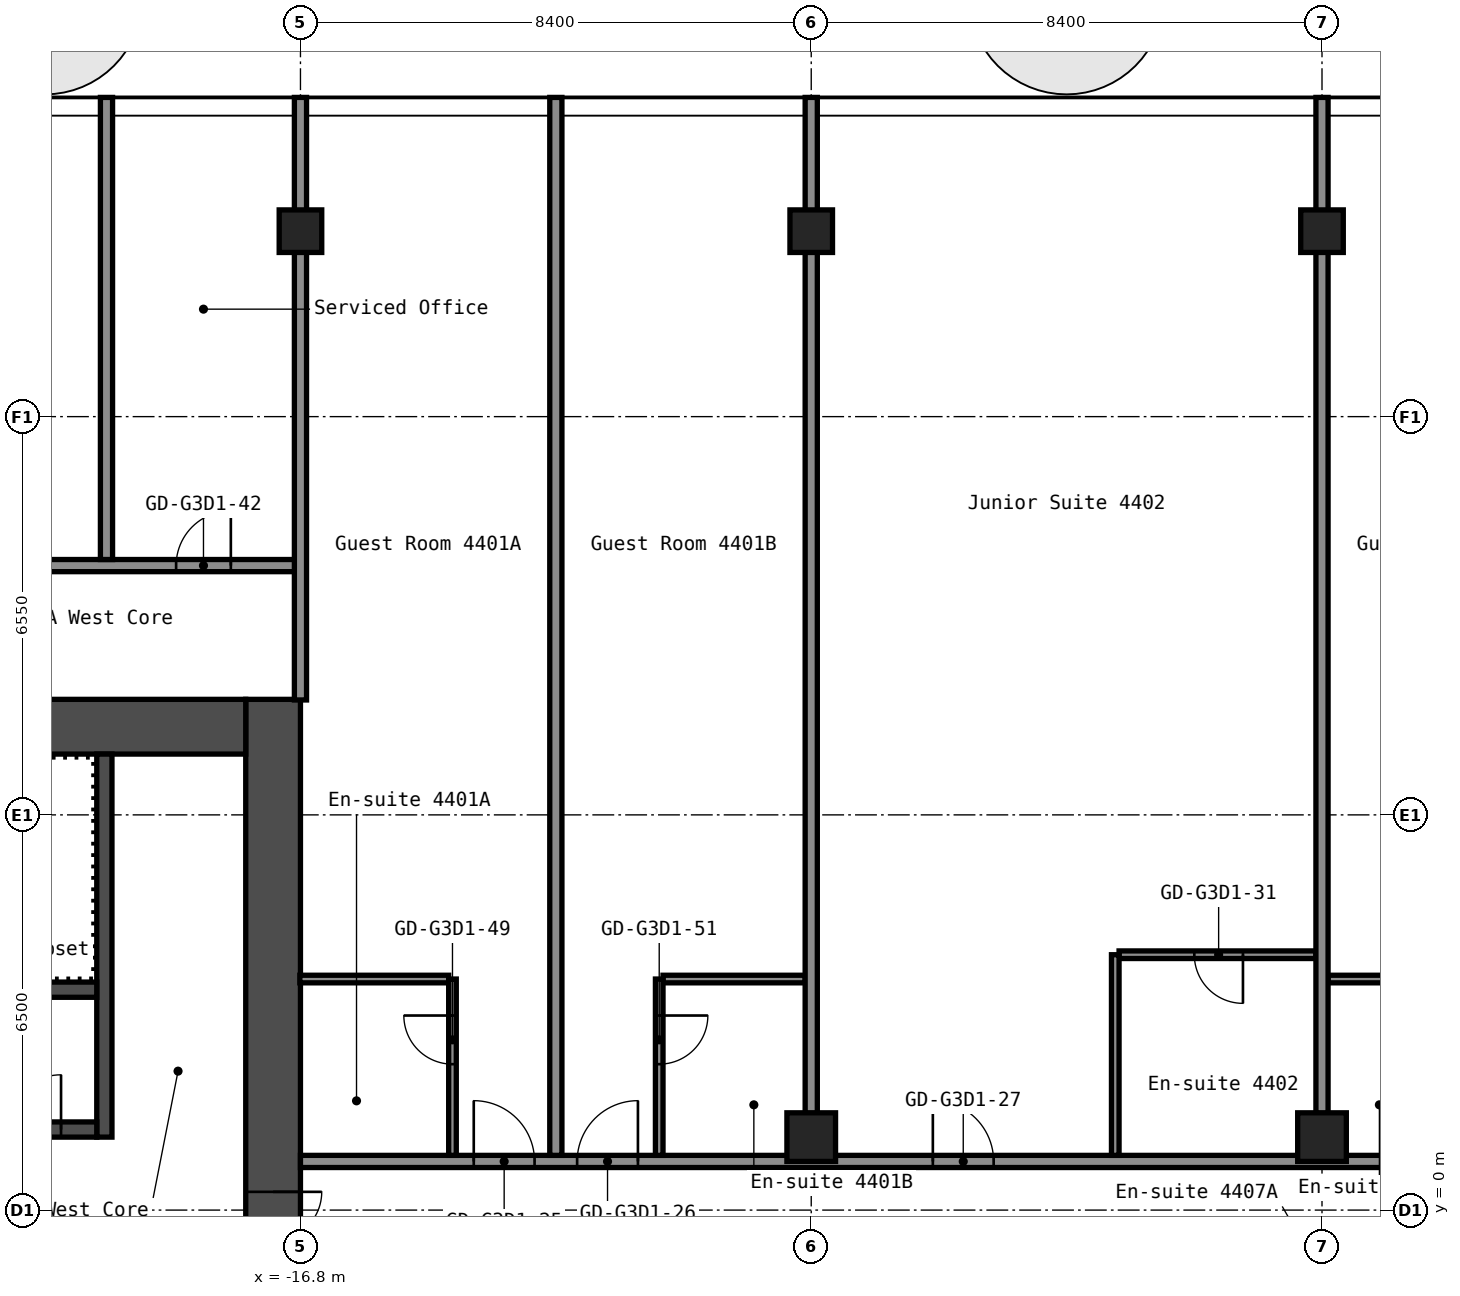
"""IFC4 building model, lengths in metres.
Left out: names, types, materials, properties, quantities, classifications, styles, units other than length and angle.
Written with IfcOpenShell. Run it as: python <this file> out.ifc"""

import sys

from ifc_helpers import new_model, si_unit, direction, frame, frame_2d, origin, origin_2d, place, context, subcontext, project, spatial, rectangle, hollow_rectangle, extrude, element, fill, save


model = new_model("IFC4")
c1 = context("Model", 3, precision=1e-05, world=origin(), true_north=direction((0.0, 1.0)))
c2 = subcontext(c1, "Body", "Model", "MODEL_VIEW")
j1 = project(units=[si_unit("LENGTHUNIT", "METRE"), si_unit("PLANEANGLEUNIT", "RADIAN")], contexts=[c1])
p1 = place(None, origin())
s1 = spatial("IfcSite", under=j1, at=p1, CompositionType="ELEMENT")
p2 = place(p1, origin())
s2 = spatial("IfcBuilding", under=s1, at=p2, CompositionType="ELEMENT")
p3 = place(p2, frame((0.0, 0.0, 156.6)))
s3 = spatial("IfcBuildingStorey", under=s2, at=p3, CompositionType="ELEMENT", Elevation=156.6)
p4 = place(p3, frame((-16.8, 16.1, 0.0), z_axis=(0.0, 0.0, 1.0), x_axis=(1.0, 0.0, 0.0)))
e1 = element("IfcColumn", 1, at=p4, inside=s3, PredefinedType="COLUMN", context=c2, shape_type="SweptSolid", body=[
    extrude(hollow_rectangle(XDim=0.7, YDim=0.7, WallThickness=0.028, at=origin_2d()), origin(), (0.0, 0.0, 1.0), 2.75),
])
p5 = place(p3, frame((-8.4, 1.2, 0.0), z_axis=(0.0, 0.0, 1.0), x_axis=(1.0, 0.0, 0.0)))
e2 = element("IfcColumn", 2, at=p5, inside=s3, PredefinedType="COLUMN", context=c2, shape_type="SweptSolid", body=[
    extrude(hollow_rectangle(XDim=0.8, YDim=0.8, WallThickness=0.032, at=origin_2d()), origin(), (0.0, 0.0, 1.0), 2.75),
])
p6 = place(p3, frame((-8.4, 16.1, 0.0), z_axis=(0.0, 0.0, 1.0), x_axis=(1.0, 0.0, 0.0)))
e3 = element("IfcColumn", 3, at=p6, inside=s3, PredefinedType="COLUMN", context=c2, shape_type="SweptSolid", body=[
    extrude(hollow_rectangle(XDim=0.7, YDim=0.7, WallThickness=0.028, at=origin_2d()), origin(), (0.0, 0.0, 1.0), 2.75),
])
p7 = place(p3, frame((0.0, 1.2, 0.0), z_axis=(0.0, 0.0, 1.0), x_axis=(1.0, 0.0, 0.0)))
e4 = element("IfcColumn", 4, at=p7, inside=s3, PredefinedType="COLUMN", context=c2, shape_type="SweptSolid", body=[
    extrude(hollow_rectangle(XDim=0.8, YDim=0.8, WallThickness=0.032, at=origin_2d()), origin(), (0.0, 0.0, 1.0), 2.75),
])
p8 = place(p3, frame((0.0, 16.1, 0.0), z_axis=(0.0, 0.0, 1.0), x_axis=(1.0, 0.0, 0.0)))
e5 = element("IfcColumn", 5, at=p8, inside=s3, PredefinedType="COLUMN", context=c2, shape_type="SweptSolid", body=[
    extrude(hollow_rectangle(XDim=0.7, YDim=0.7, WallThickness=0.028, at=origin_2d()), origin(), (0.0, 0.0, 1.0), 2.75),
])
p9 = place(p3, frame((-17.25, -8.4, 0.0), z_axis=(0.0, 0.0, 1.0), x_axis=(0.0, 1.0, 0.0)))
e6 = element("IfcWall", 6, at=p9, inside=s3, PredefinedType="SHEAR", context=c2, shape_type="SweptSolid", body=[
    extrude(rectangle(XDim=16.8, YDim=0.9, at=frame_2d((8.4, 0.0))), origin(), (0.0, 0.0, 1.0), 2.75),
])
p10 = place(p9, frame((7.1, 0.0, 0.0)))
e7 = element("IfcOpeningElement", 7, at=p10, cuts=e6, PredefinedType="OPENING", context=c2, shape_type="SweptSolid", body=[
    extrude(rectangle(XDim=1.6, YDim=2.1, at=frame_2d((0.8, 1.05))), frame((0.0, 0.46, 0.0), z_axis=(0.0, -1.0, 0.0), x_axis=(1.0, 0.0, 0.0)), (0.0, 0.0, 1.0), 0.92),
])
p11 = place(p3, frame((-32.7, 7.95, 0.0), z_axis=(0.0, 0.0, 1.0), x_axis=(1.0, 0.0, 0.0)))
e8 = element("IfcWall", 8, at=p11, inside=s3, PredefinedType="SHEAR", context=c2, shape_type="SweptSolid", body=[
    extrude(rectangle(XDim=15.0, YDim=0.9, at=frame_2d((7.5, 0.0))), origin(), (0.0, 0.0, 1.0), 2.75),
])
p12 = place(p11, frame((3.4, 0.0, 0.0)))
e9 = element("IfcOpeningElement", 9, at=p12, cuts=e8, PredefinedType="OPENING", context=c2, shape_type="SweptSolid", body=[
    extrude(rectangle(XDim=1.2, YDim=2.1, at=frame_2d((0.6, 1.05))), frame((0.0, 0.46, 0.0), z_axis=(0.0, -1.0, 0.0), x_axis=(1.0, 0.0, 0.0)), (0.0, 0.0, 1.0), 0.92),
])
p13 = place(p11, frame((0.75, 0.0, 0.0)))
e10 = element("IfcOpeningElement", 10, at=p13, cuts=e8, PredefinedType="OPENING", context=c2, shape_type="SweptSolid", body=[
    extrude(rectangle(XDim=0.9, YDim=2.1, at=frame_2d((0.45, 1.05))), frame((0.0, 0.46, 0.0), z_axis=(0.0, -1.0, 0.0), x_axis=(1.0, 0.0, 0.0)), (0.0, 0.0, 1.0), 0.92),
])
p14 = place(p3, frame((-20.025, 1.2, 0.0), z_axis=(0.0, 0.0, 1.0), x_axis=(0.0, 1.0, 0.0)))
e11 = element("IfcWall", 11, at=p14, inside=s3, PredefinedType="SHEAR", context=c2, shape_type="SweptSolid", body=[
    extrude(rectangle(XDim=6.3, YDim=0.25, at=frame_2d((3.15, 0.0))), origin(), (0.0, 0.0, 1.0), 2.75),
])
p15 = place(p3, frame((-27.65, 1.325, 0.0), z_axis=(0.0, 0.0, 1.0), x_axis=(1.0, 0.0, 0.0)))
e12 = element("IfcWall", 12, at=p15, inside=s3, PredefinedType="SHEAR", context=c2, shape_type="SweptSolid", body=[
    extrude(rectangle(XDim=7.5, YDim=0.25, at=frame_2d((3.75, 0.0))), origin(), (0.0, 0.0, 1.0), 2.75),
])
p16 = place(p15, frame((6.012, 0.0, 0.0)))
e13 = element("IfcOpeningElement", 13, at=p16, cuts=e12, PredefinedType="OPENING", context=c2, shape_type="SweptSolid", body=[
    extrude(rectangle(XDim=0.9, YDim=2.1, at=frame_2d((0.45, 1.05))), frame((0.0, 0.135, 0.0), z_axis=(0.0, -1.0, 0.0), x_axis=(1.0, 0.0, 0.0)), (0.0, 0.0, 1.0), 0.27),
])
p17 = place(p15, frame((2.312, 0.0, 0.0)))
e14 = element("IfcOpeningElement", 14, at=p17, cuts=e12, PredefinedType="OPENING", context=c2, shape_type="SweptSolid", body=[
    extrude(rectangle(XDim=0.9, YDim=2.1, at=frame_2d((0.45, 1.05))), frame((0.0, 0.135, 0.0), z_axis=(0.0, -1.0, 0.0), x_axis=(1.0, 0.0, 0.0)), (0.0, 0.0, 1.0), 0.27),
])
p18 = place(p3, frame((-27.65, 3.625, 0.0), z_axis=(0.0, 0.0, 1.0), x_axis=(1.0, 0.0, 0.0)))
e15 = element("IfcWall", 15, at=p18, inside=s3, PredefinedType="SHEAR", context=c2, shape_type="SweptSolid", body=[
    extrude(rectangle(XDim=7.5, YDim=0.25, at=frame_2d((3.75, 0.0))), origin(), (0.0, 0.0, 1.0), 2.75),
])
p19 = place(p3, frame((-16.8, 0.8, 0.0), z_axis=(0.0, 0.0, 1.0), x_axis=(1.0, 0.0, 0.0)))
e16 = element("IfcWall", 16, at=p19, inside=s3, PredefinedType="PARTITIONING", context=c2, shape_type="SweptSolid", body=[
    extrude(rectangle(XDim=33.6, YDim=0.2, at=frame_2d((16.8, 0.0))), origin(), (0.0, 0.0, 1.0), 2.75),
])
p20 = place(p19, frame((2.85, 0.0, 0.0)))
e17 = element("IfcOpeningElement", 17, at=p20, cuts=e16, PredefinedType="OPENING", context=c2, shape_type="SweptSolid", body=[
    extrude(rectangle(XDim=1.0, YDim=2.1, at=frame_2d((0.5, 1.05))), frame((0.0, 0.11, 0.0), z_axis=(0.0, -1.0, 0.0), x_axis=(1.0, 0.0, 0.0)), (0.0, 0.0, 1.0), 0.22),
])
p21 = place(p19, frame((4.55, 0.0, 0.0)))
e18 = element("IfcOpeningElement", 18, at=p21, cuts=e16, PredefinedType="OPENING", context=c2, shape_type="SweptSolid", body=[
    extrude(rectangle(XDim=1.0, YDim=2.1, at=frame_2d((0.5, 1.05))), frame((0.0, 0.11, 0.0), z_axis=(0.0, -1.0, 0.0), x_axis=(1.0, 0.0, 0.0)), (0.0, 0.0, 1.0), 0.22),
])
p22 = place(p19, frame((10.4, 0.0, 0.0)))
e19 = element("IfcOpeningElement", 19, at=p22, cuts=e16, PredefinedType="OPENING", context=c2, shape_type="SweptSolid", body=[
    extrude(rectangle(XDim=1.0, YDim=2.1, at=frame_2d((0.5, 1.05))), frame((0.0, 0.11, 0.0), z_axis=(0.0, -1.0, 0.0), x_axis=(1.0, 0.0, 0.0)), (0.0, 0.0, 1.0), 0.22),
])
p23 = place(p19, frame((19.65, 0.0, 0.0)))
e20 = element("IfcOpeningElement", 20, at=p23, cuts=e16, PredefinedType="OPENING", context=c2, shape_type="SweptSolid", body=[
    extrude(rectangle(XDim=1.0, YDim=2.1, at=frame_2d((0.5, 1.05))), frame((0.0, 0.11, 0.0), z_axis=(0.0, -1.0, 0.0), x_axis=(1.0, 0.0, 0.0)), (0.0, 0.0, 1.0), 0.22),
])
p24 = place(p19, frame((21.35, 0.0, 0.0)))
e21 = element("IfcOpeningElement", 21, at=p24, cuts=e16, PredefinedType="OPENING", context=c2, shape_type="SweptSolid", body=[
    extrude(rectangle(XDim=1.0, YDim=2.1, at=frame_2d((0.5, 1.05))), frame((0.0, 0.11, 0.0), z_axis=(0.0, -1.0, 0.0), x_axis=(1.0, 0.0, 0.0)), (0.0, 0.0, 1.0), 0.22),
])
p25 = place(p19, frame((30.6, 0.0, 0.0)))
e22 = element("IfcOpeningElement", 22, at=p25, cuts=e16, PredefinedType="OPENING", context=c2, shape_type="SweptSolid", body=[
    extrude(rectangle(XDim=1.0, YDim=2.1, at=frame_2d((0.5, 1.05))), frame((0.0, 0.11, 0.0), z_axis=(0.0, -1.0, 0.0), x_axis=(1.0, 0.0, 0.0)), (0.0, 0.0, 1.0), 0.22),
])
p26 = place(p3, frame((-16.81, 3.8, 0.0), z_axis=(0.0, 0.0, 1.0), x_axis=(1.0, 0.0, 0.0)))
e23 = element("IfcWall", 23, at=p26, inside=s3, PredefinedType="PARTITIONING", context=c2, shape_type="SweptSolid", body=[
    extrude(rectangle(XDim=2.448, YDim=0.125, at=frame_2d((1.224, 0.0))), origin(), (0.0, 0.0, 1.0), 2.75),
])
for number, where, z_axis, x_axis in (
    (24, (-10.837, 3.8, 0.0), (0.0, 0.0, 1.0), (1.0, 0.0, 0.0)),
    (25, (0.1, 3.8, 0.0), (0.0, 0.0, 1.0), (1.0, 0.0, 0.0)),
):
    element("IfcWall", number, at=place(p3, frame(where, z_axis=z_axis, x_axis=x_axis)), inside=s3, PredefinedType="PARTITIONING", context=c2, shape_type="SweptSolid", body=[
        extrude(rectangle(XDim=2.337, YDim=0.125, at=frame_2d((1.169, 0.0))), origin(), (0.0, 0.0, 1.0), 2.75),
    ])
p27 = place(p3, frame((-3.337, 4.2, 0.0), z_axis=(0.0, 0.0, 1.0), x_axis=(1.0, 0.0, 0.0)))
e26 = element("IfcWall", 26, at=p27, inside=s3, PredefinedType="PARTITIONING", context=c2, shape_type="SweptSolid", body=[
    extrude(rectangle(XDim=3.237, YDim=0.125, at=frame_2d((1.619, 0.0))), origin(), (0.0, 0.0, 1.0), 2.75),
])
p28 = place(p27, frame((1.238, 0.0, 0.0)))
e27 = element("IfcOpeningElement", 27, at=p28, cuts=e26, PredefinedType="OPENING", context=c2, shape_type="SweptSolid", body=[
    extrude(rectangle(XDim=0.8, YDim=2.1, at=frame_2d((0.4, 1.05))), frame((0.0, 0.073, 0.0), z_axis=(0.0, -1.0, 0.0), x_axis=(1.0, 0.0, 0.0)), (0.0, 0.0, 1.0), 0.145),
])
p29 = place(p3, frame((-42.7, 10.6, 0.0), z_axis=(0.0, 0.0, 1.0), x_axis=(1.0, 0.0, 0.0)))
e28 = element("IfcWall", 28, at=p29, inside=s3, PredefinedType="PARTITIONING", context=c2, shape_type="SweptSolid", body=[
    extrude(rectangle(XDim=25.9, YDim=0.2, at=frame_2d((12.95, 0.0))), origin(), (0.0, 0.0, 1.0), 2.75),
])
p30 = place(p29, frame((1.52, 0.0, 0.0)))
e29 = element("IfcOpeningElement", 29, at=p30, cuts=e28, PredefinedType="OPENING", context=c2, shape_type="SweptSolid", body=[
    extrude(rectangle(XDim=0.9, YDim=2.1, at=frame_2d((0.45, 1.05))), frame((0.0, 0.11, 0.0), z_axis=(0.0, -1.0, 0.0), x_axis=(1.0, 0.0, 0.0)), (0.0, 0.0, 1.0), 0.22),
])
p31 = place(p29, frame((5.92, 0.0, 0.0)))
e30 = element("IfcOpeningElement", 30, at=p31, cuts=e28, PredefinedType="OPENING", context=c2, shape_type="SweptSolid", body=[
    extrude(rectangle(XDim=0.9, YDim=2.1, at=frame_2d((0.45, 1.05))), frame((0.0, 0.11, 0.0), z_axis=(0.0, -1.0, 0.0), x_axis=(1.0, 0.0, 0.0)), (0.0, 0.0, 1.0), 0.22),
])
p32 = place(p29, frame((10.415, 0.0, 0.0)))
e31 = element("IfcOpeningElement", 31, at=p32, cuts=e28, PredefinedType="OPENING", context=c2, shape_type="SweptSolid", body=[
    extrude(rectangle(XDim=0.9, YDim=2.1, at=frame_2d((0.45, 1.05))), frame((0.0, 0.11, 0.0), z_axis=(0.0, -1.0, 0.0), x_axis=(1.0, 0.0, 0.0)), (0.0, 0.0, 1.0), 0.22),
])
p33 = place(p29, frame((14.615, 0.0, 0.0)))
e32 = element("IfcOpeningElement", 32, at=p33, cuts=e28, PredefinedType="OPENING", context=c2, shape_type="SweptSolid", body=[
    extrude(rectangle(XDim=0.9, YDim=2.1, at=frame_2d((0.45, 1.05))), frame((0.0, 0.11, 0.0), z_axis=(0.0, -1.0, 0.0), x_axis=(1.0, 0.0, 0.0)), (0.0, 0.0, 1.0), 0.22),
])
p34 = place(p29, frame((19.655, 0.0, 0.0)))
e33 = element("IfcOpeningElement", 33, at=p34, cuts=e28, PredefinedType="OPENING", context=c2, shape_type="SweptSolid", body=[
    extrude(rectangle(XDim=0.9, YDim=2.1, at=frame_2d((0.45, 1.05))), frame((0.0, 0.11, 0.0), z_axis=(0.0, -1.0, 0.0), x_axis=(1.0, 0.0, 0.0)), (0.0, 0.0, 1.0), 0.22),
])
p35 = place(p29, frame((23.855, 0.0, 0.0)))
e34 = element("IfcOpeningElement", 34, at=p35, cuts=e28, PredefinedType="OPENING", context=c2, shape_type="SweptSolid", body=[
    extrude(rectangle(XDim=0.9, YDim=2.1, at=frame_2d((0.45, 1.05))), frame((0.0, 0.11, 0.0), z_axis=(0.0, -1.0, 0.0), x_axis=(1.0, 0.0, 0.0)), (0.0, 0.0, 1.0), 0.22),
])
p36 = place(p3, frame((-19.99, 10.7, 0.0), z_axis=(0.0, 0.0, 1.0), x_axis=(0.0, 1.0, 0.0)))
e35 = element("IfcWall", 35, at=p36, inside=s3, PredefinedType="PARTITIONING", context=c2, shape_type="SweptSolid", body=[
    extrude(rectangle(XDim=7.6, YDim=0.2, at=frame_2d((3.8, 0.0))), origin(), (0.0, 0.0, 1.0), 2.75),
])
p37 = place(p3, frame((-16.8, 8.39, 0.0), z_axis=(0.0, 0.0, 1.0), x_axis=(0.0, 1.0, 0.0)))
e36 = element("IfcWall", 36, at=p37, inside=s3, PredefinedType="PARTITIONING", context=c2, shape_type="SweptSolid", body=[
    extrude(rectangle(XDim=9.91, YDim=0.2, at=frame_2d((4.955, 0.0))), origin(), (0.0, 0.0, 1.0), 2.75),
])
p38 = place(p3, frame((-14.3, 0.9, 0.0), z_axis=(0.0, 0.0, 1.0), x_axis=(0.0, 1.0, 0.0)))
e37 = element("IfcWall", 37, at=p38, inside=s3, PredefinedType="PARTITIONING", context=c2, shape_type="SweptSolid", body=[
    extrude(rectangle(XDim=2.9, YDim=0.125, at=frame_2d((1.45, 0.0))), origin(), (0.0, 0.0, 1.0), 2.75),
])
p39 = place(p38, frame((1.5, 0.0, 0.0)))
e38 = element("IfcOpeningElement", 38, at=p39, cuts=e37, PredefinedType="OPENING", context=c2, shape_type="SweptSolid", body=[
    extrude(rectangle(XDim=0.8, YDim=2.1, at=frame_2d((0.4, 1.05))), frame((0.0, 0.073, 0.0), z_axis=(0.0, -1.0, 0.0), x_axis=(1.0, 0.0, 0.0)), (0.0, 0.0, 1.0), 0.145),
])
p40 = place(p3, frame((-12.6, 0.9, 0.0), z_axis=(0.0, 0.0, 1.0), x_axis=(0.0, 1.0, 0.0)))
e39 = element("IfcWall", 39, at=p40, inside=s3, PredefinedType="PARTITIONING", context=c2, shape_type="SweptSolid", body=[
    extrude(rectangle(XDim=17.4, YDim=0.2, at=frame_2d((8.7, 0.0))), origin(), (0.0, 0.0, 1.0), 2.75),
])
p41 = place(p3, frame((-10.9, 0.9, 0.0), z_axis=(0.0, 0.0, 1.0), x_axis=(0.0, 1.0, 0.0)))
e40 = element("IfcWall", 40, at=p41, inside=s3, PredefinedType="PARTITIONING", context=c2, shape_type="SweptSolid", body=[
    extrude(rectangle(XDim=2.9, YDim=0.125, at=frame_2d((1.45, 0.0))), origin(), (0.0, 0.0, 1.0), 2.75),
])
p42 = place(p41, frame((1.5, 0.0, 0.0)))
e41 = element("IfcOpeningElement", 41, at=p42, cuts=e40, PredefinedType="OPENING", context=c2, shape_type="SweptSolid", body=[
    extrude(rectangle(XDim=0.8, YDim=2.1, at=frame_2d((0.4, 1.05))), frame((0.0, 0.073, 0.0), z_axis=(0.0, -1.0, 0.0), x_axis=(1.0, 0.0, 0.0)), (0.0, 0.0, 1.0), 0.145),
])
p43 = place(p3, frame((-8.4, 1.59, 0.0), z_axis=(0.0, 0.0, 1.0), x_axis=(0.0, 1.0, 0.0)))
e42 = element("IfcWall", 42, at=p43, inside=s3, PredefinedType="PARTITIONING", context=c2, shape_type="SweptSolid", body=[
    extrude(rectangle(XDim=16.71, YDim=0.2, at=frame_2d((8.355, 0.0))), origin(), (0.0, 0.0, 1.0), 2.75),
])
p44 = place(p3, frame((-3.4, 0.9, 0.0), z_axis=(0.0, 0.0, 1.0), x_axis=(0.0, 1.0, 0.0)))
e43 = element("IfcWall", 43, at=p44, inside=s3, PredefinedType="PARTITIONING", context=c2, shape_type="SweptSolid", body=[
    extrude(rectangle(XDim=3.3, YDim=0.125, at=frame_2d((1.65, 0.0))), origin(), (0.0, 0.0, 1.0), 2.75),
])
p45 = place(p3, frame((0.0, 1.59, 0.0), z_axis=(0.0, 0.0, 1.0), x_axis=(0.0, 1.0, 0.0)))
e44 = element("IfcWall", 44, at=p45, inside=s3, PredefinedType="PARTITIONING", context=c2, shape_type="SweptSolid", body=[
    extrude(rectangle(XDim=16.71, YDim=0.2, at=frame_2d((8.355, 0.0))), origin(), (0.0, 0.0, 1.0), 2.75),
])
p46 = place(p10, origin())
e45 = element("IfcDoor", 45, at=p46, inside=s3, OperationType="DOUBLE_DOOR_SINGLE_SWING", PredefinedType="DOOR", context=c2, shape_type="SweptSolid", body=[
    extrude(rectangle(XDim=1.6, YDim=2.1, at=frame_2d((0.8, 1.05))), frame((0.0, 0.025, 0.0), z_axis=(0.0, -1.0, 0.0), x_axis=(1.0, 0.0, 0.0)), (0.0, 0.0, 1.0), 0.05),
])
fill(e7, e45)
p47 = place(p16, origin())
e46 = element("IfcDoor", 46, at=p47, inside=s3, OperationType="SINGLE_SWING_LEFT", PredefinedType="DOOR", context=c2, shape_type="SweptSolid", body=[
    extrude(rectangle(XDim=0.9, YDim=2.1, at=frame_2d((0.45, 1.05))), frame((0.0, 0.025, 0.0), z_axis=(0.0, -1.0, 0.0), x_axis=(1.0, 0.0, 0.0)), (0.0, 0.0, 1.0), 0.05),
])
fill(e13, e46)
p48 = place(p20, origin())
e47 = element("IfcDoor", 47, at=p48, inside=s3, OperationType="SINGLE_SWING_RIGHT", PredefinedType="DOOR", context=c2, shape_type="SweptSolid", body=[
    extrude(rectangle(XDim=1.0, YDim=2.1, at=frame_2d((0.5, 1.05))), frame((0.0, 0.025, 0.0), z_axis=(0.0, -1.0, 0.0), x_axis=(1.0, 0.0, 0.0)), (0.0, 0.0, 1.0), 0.05),
])
fill(e17, e47)
p49 = place(p21, origin())
e48 = element("IfcDoor", 48, at=p49, inside=s3, OperationType="SINGLE_SWING_LEFT", PredefinedType="DOOR", context=c2, shape_type="SweptSolid", body=[
    extrude(rectangle(XDim=1.0, YDim=2.1, at=frame_2d((0.5, 1.05))), frame((0.0, 0.025, 0.0), z_axis=(0.0, -1.0, 0.0), x_axis=(1.0, 0.0, 0.0)), (0.0, 0.0, 1.0), 0.05),
])
fill(e18, e48)
p50 = place(p22, origin())
e49 = element("IfcDoor", 49, at=p50, inside=s3, OperationType="SINGLE_SWING_RIGHT", PredefinedType="DOOR", context=c2, shape_type="SweptSolid", body=[
    extrude(rectangle(XDim=1.0, YDim=2.1, at=frame_2d((0.5, 1.05))), frame((0.0, 0.025, 0.0), z_axis=(0.0, -1.0, 0.0), x_axis=(1.0, 0.0, 0.0)), (0.0, 0.0, 1.0), 0.05),
])
fill(e19, e49)
p51 = place(p28, origin())
e50 = element("IfcDoor", 50, at=p51, inside=s3, OperationType="SINGLE_SWING_RIGHT", PredefinedType="DOOR", context=c2, shape_type="SweptSolid", body=[
    extrude(rectangle(XDim=0.8, YDim=2.1, at=frame_2d((0.4, 1.05))), frame((0.0, 0.025, 0.0), z_axis=(0.0, -1.0, 0.0), x_axis=(1.0, 0.0, 0.0)), (0.0, 0.0, 1.0), 0.05),
])
fill(e27, e50)
p52 = place(p35, origin())
e51 = element("IfcDoor", 51, at=p52, inside=s3, OperationType="SINGLE_SWING_LEFT", PredefinedType="DOOR", context=c2, shape_type="SweptSolid", body=[
    extrude(rectangle(XDim=0.9, YDim=2.1, at=frame_2d((0.45, 1.05))), frame((0.0, 0.025, 0.0), z_axis=(0.0, -1.0, 0.0), x_axis=(1.0, 0.0, 0.0)), (0.0, 0.0, 1.0), 0.05),
])
fill(e34, e51)
p53 = place(p39, origin())
e52 = element("IfcDoor", 52, at=p53, inside=s3, OperationType="SINGLE_SWING_LEFT", PredefinedType="DOOR", context=c2, shape_type="SweptSolid", body=[
    extrude(rectangle(XDim=0.8, YDim=2.1, at=frame_2d((0.4, 1.05))), frame((0.0, 0.025, 0.0), z_axis=(0.0, -1.0, 0.0), x_axis=(1.0, 0.0, 0.0)), (0.0, 0.0, 1.0), 0.05),
])
fill(e38, e52)
p54 = place(p42, origin())
e53 = element("IfcDoor", 53, at=p54, inside=s3, OperationType="SINGLE_SWING_RIGHT", PredefinedType="DOOR", context=c2, shape_type="SweptSolid", body=[
    extrude(rectangle(XDim=0.8, YDim=2.1, at=frame_2d((0.4, 1.05))), frame((0.0, 0.025, 0.0), z_axis=(0.0, -1.0, 0.0), x_axis=(1.0, 0.0, 0.0)), (0.0, 0.0, 1.0), 0.05),
])
fill(e41, e53)
save(model, sys.argv[1])
